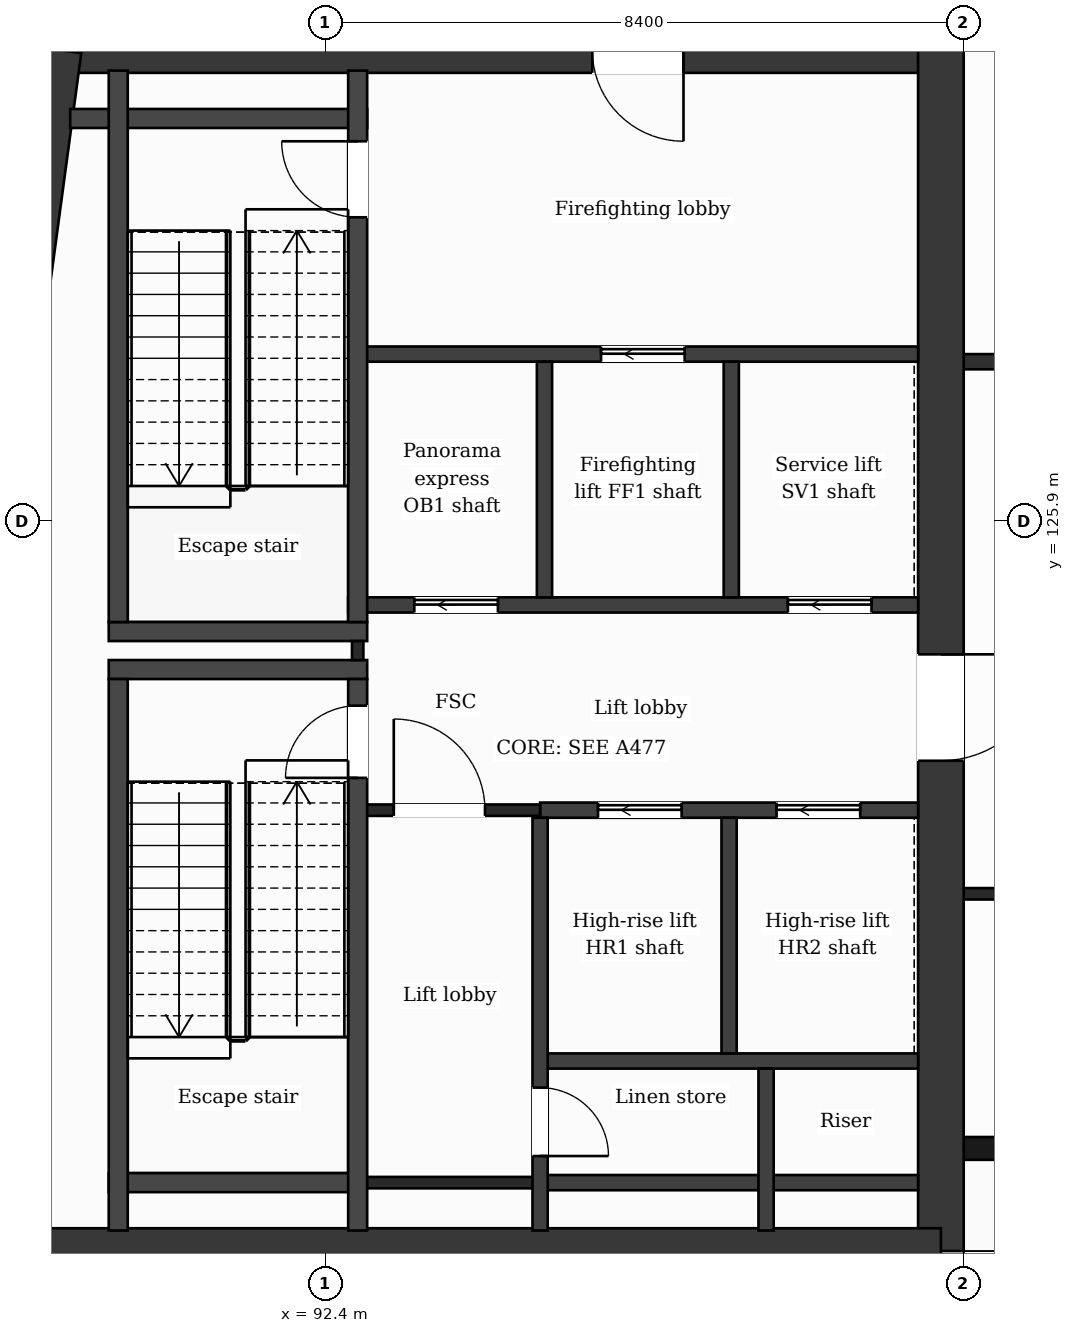
"""IFC4 building model, lengths in metres.
Left out: names, types, materials, properties, quantities, classifications, styles, units other than length and angle.
Written with IfcOpenShell. Run it as: python <this file> out.ifc"""

import sys

from ifc_helpers import new_model, si_unit, direction, frame, frame_2d, origin, place, context, subcontext, project, spatial, rectangle, extrude, element, fill, save


model = new_model("IFC4")
c1 = context("Model", 3, precision=1e-05, world=origin(), true_north=direction((0.0, 1.0)))
c2 = subcontext(c1, "Body", "Model", "MODEL_VIEW")
j1 = project(units=[si_unit("LENGTHUNIT", "METRE"), si_unit("PLANEANGLEUNIT", "RADIAN")], contexts=[c1])
p1 = place(None, origin())
s1 = spatial("IfcSite", under=j1, at=p1, CompositionType="ELEMENT")
p2 = place(p1, origin())
s2 = spatial("IfcBuilding", under=s1, at=p2, CompositionType="ELEMENT")
p3 = place(p2, frame((0.0, 0.0, 315.4)))
s3 = spatial("IfcBuildingStorey", under=s2, at=p3, CompositionType="ELEMENT", Elevation=315.4)
p4 = place(p3, frame((88.893, 132.1, 0.0), z_axis=(0.0, 0.0, 1.0), x_axis=(1.0, 0.0, 0.0)))
e1 = element("IfcWall", 1, at=p4, inside=s3, PredefinedType="SHEAR", context=c2, shape_type="SweptSolid", body=[
    extrude(rectangle(XDim=11.607, YDim=0.6, at=frame_2d((5.803, 0.0))), origin(), (0.0, 0.0, 1.0), 4.5),
])
p5 = place(p4, frame((7.021, 0.0, 0.0)))
e2 = element("IfcOpeningElement", 2, at=p5, cuts=e1, PredefinedType="OPENING", context=c2, shape_type="SweptSolid", body=[
    extrude(rectangle(XDim=1.2, YDim=2.1, at=frame_2d((0.6, 1.05))), frame((0.0, 0.31, 0.0), z_axis=(0.0, -1.0, 0.0), x_axis=(1.0, 0.0, 0.0)), (0.0, 0.0, 1.0), 0.62),
])
p6 = place(p3, frame((100.5, 132.1, 0.0), z_axis=(0.0, 0.0, 1.0), x_axis=(0.0, -1.0, 0.0)))
e3 = element("IfcWall", 3, at=p6, inside=s3, PredefinedType="SHEAR", context=c2, shape_type="SweptSolid", body=[
    extrude(rectangle(XDim=15.8, YDim=0.6, at=frame_2d((7.9, 0.0))), origin(), (0.0, 0.0, 1.0), 4.5),
])
p7 = place(p6, frame((7.95, 0.0, 0.0)))
e4 = element("IfcOpeningElement", 4, at=p7, cuts=e3, PredefinedType="OPENING", context=c2, shape_type="SweptSolid", body=[
    extrude(rectangle(XDim=1.4, YDim=2.1, at=frame_2d((0.7, 1.05))), frame((0.0, 0.31, 0.0), z_axis=(0.0, -1.0, 0.0), x_axis=(1.0, 0.0, 0.0)), (0.0, 0.0, 1.0), 0.62),
])
p8 = place(p3, frame((100.5, 116.3, 0.0), z_axis=(0.0, 0.0, 1.0), x_axis=(-1.0, 0.0, 0.0)))
e5 = element("IfcWall", 5, at=p8, inside=s3, PredefinedType="SHEAR", context=c2, shape_type="SweptSolid", body=[
    extrude(rectangle(XDim=13.734, YDim=0.6, at=frame_2d((6.867, 0.0))), origin(), (0.0, 0.0, 1.0), 4.5),
])
p9 = place(p3, frame((86.766, 116.3, 0.0), z_axis=(0.0, 0.0, 1.0), x_axis=(0.13341345841, 0.991060466932, 0.0)))
e6 = element("IfcWall", 6, at=p9, inside=s3, PredefinedType="SHEAR", context=c2, shape_type="SweptSolid", body=[
    extrude(rectangle(XDim=15.943, YDim=0.6, at=frame_2d((7.971, 0.0))), origin(), (0.0, 0.0, 1.0), 4.5),
])
p10 = place(p3, frame((100.8, 117.65, 0.0), z_axis=(0.0, 0.0, 1.0), x_axis=(1.0, 0.0, 0.0)))
e7 = element("IfcWall", 7, at=p10, inside=s3, PredefinedType="SOLIDWALL", context=c2, shape_type="SweptSolid", body=[
    extrude(rectangle(XDim=25.2, YDim=0.3, at=frame_2d((12.6, 0.0))), origin(), (0.0, 0.0, 1.0), 4.05),
])
p11 = place(p10, frame((1.55, 0.0, 0.9)))
e8 = element("IfcOpeningElement", 8, at=p11, cuts=e7, PredefinedType="OPENING", context=c2, shape_type="SweptSolid", body=[
    extrude(rectangle(XDim=1.2, YDim=2.1, at=frame_2d((0.6, 1.05))), frame((0.0, 0.16, 0.0), z_axis=(0.0, -1.0, 0.0), x_axis=(1.0, 0.0, 0.0)), (0.0, 0.0, 1.0), 0.32),
])
p12 = place(p10, frame((5.7, 0.0, 0.9)))
e9 = element("IfcOpeningElement", 9, at=p12, cuts=e7, PredefinedType="OPENING", context=c2, shape_type="SweptSolid", body=[
    extrude(rectangle(XDim=1.2, YDim=2.1, at=frame_2d((0.6, 1.05))), frame((0.0, 0.16, 0.0), z_axis=(0.0, -1.0, 0.0), x_axis=(1.0, 0.0, 0.0)), (0.0, 0.0, 1.0), 0.32),
])
p13 = place(p10, frame((9.0, 0.0, 0.0)))
e10 = element("IfcOpeningElement", 10, at=p13, cuts=e7, PredefinedType="OPENING", context=c2, shape_type="SweptSolid", body=[
    extrude(rectangle(XDim=1.2, YDim=2.4, at=frame_2d((0.6, 1.2))), frame((0.0, 0.16, 0.0), z_axis=(0.0, -1.0, 0.0), x_axis=(1.0, 0.0, 0.0)), (0.0, 0.0, 1.0), 0.32),
])
p14 = place(p10, frame((10.8, 0.0, 0.9)))
e11 = element("IfcOpeningElement", 11, at=p14, cuts=e7, PredefinedType="OPENING", context=c2, shape_type="SweptSolid", body=[
    extrude(rectangle(XDim=1.2, YDim=2.1, at=frame_2d((0.6, 1.05))), frame((0.0, 0.16, 0.0), z_axis=(0.0, -1.0, 0.0), x_axis=(1.0, 0.0, 0.0)), (0.0, 0.0, 1.0), 0.32),
])
p15 = place(p10, frame((13.5, 0.0, 0.9)))
e12 = element("IfcOpeningElement", 12, at=p15, cuts=e7, PredefinedType="OPENING", context=c2, shape_type="SweptSolid", body=[
    extrude(rectangle(XDim=2.4, YDim=2.1, at=frame_2d((1.2, 1.05))), frame((0.0, 0.16, 0.0), z_axis=(0.0, -1.0, 0.0), x_axis=(1.0, 0.0, 0.0)), (0.0, 0.0, 1.0), 0.32),
])
p16 = place(p10, frame((17.4, 0.0, 0.0)))
e13 = element("IfcOpeningElement", 13, at=p16, cuts=e7, PredefinedType="OPENING", context=c2, shape_type="SweptSolid", body=[
    extrude(rectangle(XDim=1.2, YDim=2.4, at=frame_2d((0.6, 1.2))), frame((0.0, 0.16, 0.0), z_axis=(0.0, -1.0, 0.0), x_axis=(1.0, 0.0, 0.0)), (0.0, 0.0, 1.0), 0.32),
])
p17 = place(p10, frame((19.2, 0.0, 0.9)))
e14 = element("IfcOpeningElement", 14, at=p17, cuts=e7, PredefinedType="OPENING", context=c2, shape_type="SweptSolid", body=[
    extrude(rectangle(XDim=1.2, YDim=2.1, at=frame_2d((0.6, 1.05))), frame((0.0, 0.16, 0.0), z_axis=(0.0, -1.0, 0.0), x_axis=(1.0, 0.0, 0.0)), (0.0, 0.0, 1.0), 0.32),
])
p18 = place(p10, frame((21.85, 0.0, 0.9)))
e15 = element("IfcOpeningElement", 15, at=p18, cuts=e7, PredefinedType="OPENING", context=c2, shape_type="SweptSolid", body=[
    extrude(rectangle(XDim=2.4, YDim=2.1, at=frame_2d((1.2, 1.05))), frame((0.0, 0.16, 0.0), z_axis=(0.0, -1.0, 0.0), x_axis=(1.0, 0.0, 0.0)), (0.0, 0.0, 1.0), 0.32),
])
p19 = place(p3, frame((95.227, 117.2, 0.0), z_axis=(0.0, 0.0, 1.0), x_axis=(1.0, 0.0, 0.0)))
e16 = element("IfcWall", 16, at=p19, inside=s3, PredefinedType="PARTITIONING", context=c2, shape_type="SweptSolid", body=[
    extrude(rectangle(XDim=4.973, YDim=0.2, at=frame_2d((2.486, 0.0))), origin(), (0.0, 0.0, 1.0), 4.05),
])
p20 = place(p3, frame((92.827, 117.2, 0.0), z_axis=(0.0, 0.0, 1.0), x_axis=(1.0, 0.0, 0.0)))
e17 = element("IfcWall", 17, at=p20, inside=s3, PredefinedType="PARTITIONING", context=c2, shape_type="SweptSolid", body=[
    extrude(rectangle(XDim=2.4, YDim=0.15, at=frame_2d((1.2, 0.0))), origin(), (0.0, 0.0, 1.0), 4.05),
])
p21 = place(p3, frame((89.552, 117.2, 0.0), z_axis=(0.0, 0.0, 1.0), x_axis=(1.0, 0.0, 0.0)))
e18 = element("IfcWall", 18, at=p21, inside=s3, PredefinedType="PARTITIONING", context=c2, shape_type="SweptSolid", body=[
    extrude(rectangle(XDim=3.275, YDim=0.25, at=frame_2d((1.637, 0.0))), origin(), (0.0, 0.0, 1.0), 4.05),
])
p22 = place(p3, frame((95.227, 118.8, 0.0), z_axis=(0.0, 0.0, 1.0), x_axis=(1.0, 0.0, 0.0)))
e19 = element("IfcWall", 19, at=p22, inside=s3, PredefinedType="PARTITIONING", context=c2, shape_type="SweptSolid", body=[
    extrude(rectangle(XDim=4.973, YDim=0.2, at=frame_2d((2.486, 0.0))), origin(), (0.0, 0.0, 1.0), 4.05),
])
p23 = place(p3, frame((100.8, 121.0, 0.0), z_axis=(0.0, 0.0, 1.0), x_axis=(1.0, 0.0, 0.0)))
e20 = element("IfcWall", 20, at=p23, inside=s3, PredefinedType="PARTITIONING", context=c2, shape_type="SweptSolid", body=[
    extrude(rectangle(XDim=21.075, YDim=0.15, at=frame_2d((10.538, 0.0))), origin(), (0.0, 0.0, 1.0), 4.05),
])
p24 = place(p23, frame((2.9, 0.0, 0.0)))
e21 = element("IfcOpeningElement", 21, at=p24, cuts=e20, PredefinedType="OPENING", context=c2, shape_type="SweptSolid", body=[
    extrude(rectangle(XDim=1.2, YDim=2.1, at=frame_2d((0.6, 1.05))), frame((0.0, 0.085, 0.0), z_axis=(0.0, -1.0, 0.0), x_axis=(1.0, 0.0, 0.0)), (0.0, 0.0, 1.0), 0.17),
])
p25 = place(p23, frame((9.9, 0.0, 0.0)))
e22 = element("IfcOpeningElement", 22, at=p25, cuts=e20, PredefinedType="OPENING", context=c2, shape_type="SweptSolid", body=[
    extrude(rectangle(XDim=1.2, YDim=2.1, at=frame_2d((0.6, 1.05))), frame((0.0, 0.085, 0.0), z_axis=(0.0, -1.0, 0.0), x_axis=(1.0, 0.0, 0.0)), (0.0, 0.0, 1.0), 0.17),
])
p26 = place(p3, frame((95.227, 122.1, 0.0), z_axis=(0.0, 0.0, 1.0), x_axis=(1.0, 0.0, 0.0)))
e23 = element("IfcWall", 23, at=p26, inside=s3, PredefinedType="PARTITIONING", context=c2, shape_type="SweptSolid", body=[
    extrude(rectangle(XDim=4.973, YDim=0.2, at=frame_2d((2.486, 0.0))), origin(), (0.0, 0.0, 1.0), 4.05),
])
p27 = place(p26, frame((0.762, 0.0, 0.0)))
e24 = element("IfcOpeningElement", 24, at=p27, cuts=e23, PredefinedType="OPENING", context=c2, shape_type="SweptSolid", body=[
    extrude(rectangle(XDim=1.1, YDim=2.1, at=frame_2d((0.55, 1.05))), frame((0.0, 0.11, 0.0), z_axis=(0.0, -1.0, 0.0), x_axis=(1.0, 0.0, 0.0)), (0.0, 0.0, 1.0), 0.22),
])
p28 = place(p26, frame((3.111, 0.0, 0.0)))
e25 = element("IfcOpeningElement", 25, at=p28, cuts=e23, PredefinedType="OPENING", context=c2, shape_type="SweptSolid", body=[
    extrude(rectangle(XDim=1.1, YDim=2.1, at=frame_2d((0.55, 1.05))), frame((0.0, 0.11, 0.0), z_axis=(0.0, -1.0, 0.0), x_axis=(1.0, 0.0, 0.0)), (0.0, 0.0, 1.0), 0.22),
])
p29 = place(p3, frame((92.827, 122.1, 0.0), z_axis=(0.0, 0.0, 1.0), x_axis=(1.0, 0.0, 0.0)))
e26 = element("IfcWall", 26, at=p29, inside=s3, PredefinedType="PARTITIONING", context=c2, shape_type="SweptSolid", body=[
    extrude(rectangle(XDim=2.4, YDim=0.15, at=frame_2d((1.2, 0.0))), origin(), (0.0, 0.0, 1.0), 4.05),
])
p30 = place(p29, frame((0.475, 0.0, 0.0)))
e27 = element("IfcOpeningElement", 27, at=p30, cuts=e26, PredefinedType="OPENING", context=c2, shape_type="SweptSolid", body=[
    extrude(rectangle(XDim=1.2, YDim=2.1, at=frame_2d((0.6, 1.05))), frame((0.0, 0.085, 0.0), z_axis=(0.0, -1.0, 0.0), x_axis=(1.0, 0.0, 0.0)), (0.0, 0.0, 1.0), 0.17),
])
for number, where, z_axis, x_axis in (
    (28, (89.552, 123.95, 0.0), (0.0, 0.0, 1.0), (1.0, 0.0, 0.0)),
    (29, (89.552, 124.45, 0.0), (0.0, 0.0, 1.0), (1.0, 0.0, 0.0)),
):
    element("IfcWall", number, at=place(p3, frame(where, z_axis=z_axis, x_axis=x_axis)), inside=s3, PredefinedType="PARTITIONING", context=c2, shape_type="SweptSolid", body=[
        extrude(rectangle(XDim=3.4, YDim=0.25, at=frame_2d((1.7, 0.0))), origin(), (0.0, 0.0, 1.0), 4.05),
    ])
p31 = place(p3, frame((92.702, 124.8, 0.0), z_axis=(0.0, 0.0, 1.0), x_axis=(1.0, 0.0, 0.0)))
e30 = element("IfcWall", 30, at=p31, inside=s3, PredefinedType="PARTITIONING", context=c2, shape_type="SweptSolid", body=[
    extrude(rectangle(XDim=7.498, YDim=0.2, at=frame_2d((3.749, 0.0))), origin(), (0.0, 0.0, 1.0), 4.05),
])
p32 = place(p31, frame((0.87, 0.0, 0.0)))
e31 = element("IfcOpeningElement", 31, at=p32, cuts=e30, PredefinedType="OPENING", context=c2, shape_type="SweptSolid", body=[
    extrude(rectangle(XDim=1.1, YDim=2.1, at=frame_2d((0.55, 1.05))), frame((0.0, 0.11, 0.0), z_axis=(0.0, -1.0, 0.0), x_axis=(1.0, 0.0, 0.0)), (0.0, 0.0, 1.0), 0.22),
])
p33 = place(p31, frame((5.785, 0.0, 0.0)))
e32 = element("IfcOpeningElement", 32, at=p33, cuts=e30, PredefinedType="OPENING", context=c2, shape_type="SweptSolid", body=[
    extrude(rectangle(XDim=1.1, YDim=2.1, at=frame_2d((0.55, 1.05))), frame((0.0, 0.11, 0.0), z_axis=(0.0, -1.0, 0.0), x_axis=(1.0, 0.0, 0.0)), (0.0, 0.0, 1.0), 0.22),
])
p34 = place(p3, frame((100.8, 128.0, 0.0), z_axis=(0.0, 0.0, 1.0), x_axis=(1.0, 0.0, 0.0)))
e33 = element("IfcWall", 33, at=p34, inside=s3, PredefinedType="PARTITIONING", context=c2, shape_type="SweptSolid", body=[
    extrude(rectangle(XDim=21.0, YDim=0.2, at=frame_2d((10.5, 0.0))), origin(), (0.0, 0.0, 1.0), 4.05),
])
p35 = place(p3, frame((92.827, 128.1, 0.0), z_axis=(0.0, 0.0, 1.0), x_axis=(1.0, 0.0, 0.0)))
e34 = element("IfcWall", 34, at=p35, inside=s3, PredefinedType="PARTITIONING", context=c2, shape_type="SweptSolid", body=[
    extrude(rectangle(XDim=7.373, YDim=0.2, at=frame_2d((3.687, 0.0))), origin(), (0.0, 0.0, 1.0), 4.05),
])
p36 = place(p35, frame((3.202, 0.0, 0.0)))
e35 = element("IfcOpeningElement", 35, at=p36, cuts=e34, PredefinedType="OPENING", context=c2, shape_type="SweptSolid", body=[
    extrude(rectangle(XDim=1.1, YDim=2.1, at=frame_2d((0.55, 1.05))), frame((0.0, 0.11, 0.0), z_axis=(0.0, -1.0, 0.0), x_axis=(1.0, 0.0, 0.0)), (0.0, 0.0, 1.0), 0.22),
])
p37 = place(p3, frame((89.045, 131.2, 0.0), z_axis=(0.0, 0.0, 1.0), x_axis=(1.0, 0.0, 0.0)))
e36 = element("IfcWall", 36, at=p37, inside=s3, PredefinedType="PARTITIONING", context=c2, shape_type="SweptSolid", body=[
    extrude(rectangle(XDim=3.907, YDim=0.25, at=frame_2d((1.954, 0.0))), origin(), (0.0, 0.0, 1.0), 4.05),
])
p38 = place(p3, frame((89.677, 116.57, 0.0), z_axis=(0.0, 0.0, 1.0), x_axis=(0.0, 1.0, 0.0)))
e37 = element("IfcWall", 37, at=p38, inside=s3, PredefinedType="PARTITIONING", context=c2, shape_type="SweptSolid", body=[
    extrude(rectangle(XDim=7.255, YDim=0.25, at=frame_2d((3.627, 0.0))), origin(), (0.0, 0.0, 1.0), 4.05),
])
p39 = place(p3, frame((89.677, 124.575, 0.0), z_axis=(0.0, 0.0, 1.0), x_axis=(0.0, 1.0, 0.0)))
e38 = element("IfcWall", 38, at=p39, inside=s3, PredefinedType="PARTITIONING", context=c2, shape_type="SweptSolid", body=[
    extrude(rectangle(XDim=7.255, YDim=0.25, at=frame_2d((3.627, 0.0))), origin(), (0.0, 0.0, 1.0), 4.05),
])
p40 = place(p3, frame((92.827, 124.075, 0.0), z_axis=(0.0, 0.0, 1.0), x_axis=(0.0, 1.0, 0.0)))
e39 = element("IfcWall", 39, at=p40, inside=s3, PredefinedType="PARTITIONING", context=c2, shape_type="SweptSolid", body=[
    extrude(rectangle(XDim=0.25, YDim=0.15, at=frame_2d((0.125, 0.0))), origin(), (0.0, 0.0, 1.0), 4.05),
])
p41 = place(p3, frame((92.827, 116.57, 0.0), z_axis=(0.0, 0.0, 1.0), x_axis=(0.0, 1.0, 0.0)))
e40 = element("IfcWall", 40, at=p41, inside=s3, PredefinedType="PARTITIONING", context=c2, shape_type="SweptSolid", body=[
    extrude(rectangle(XDim=7.255, YDim=0.25, at=frame_2d((3.627, 0.0))), origin(), (0.0, 0.0, 1.0), 4.05),
])
p42 = place(p41, frame((5.955, 0.0, 0.0)))
e41 = element("IfcOpeningElement", 41, at=p42, cuts=e40, PredefinedType="OPENING", context=c2, shape_type="SweptSolid", body=[
    extrude(rectangle(XDim=0.95, YDim=2.1, at=frame_2d((0.475, 1.05))), frame((0.0, 0.135, 0.0), z_axis=(0.0, -1.0, 0.0), x_axis=(1.0, 0.0, 0.0)), (0.0, 0.0, 1.0), 0.27),
])
p43 = place(p3, frame((92.827, 124.575, 0.0), z_axis=(0.0, 0.0, 1.0), x_axis=(0.0, 1.0, 0.0)))
e42 = element("IfcWall", 42, at=p43, inside=s3, PredefinedType="PARTITIONING", context=c2, shape_type="SweptSolid", body=[
    extrude(rectangle(XDim=7.255, YDim=0.25, at=frame_2d((3.627, 0.0))), origin(), (0.0, 0.0, 1.0), 4.05),
])
p44 = place(p43, frame((5.325, 0.0, 0.0)))
e43 = element("IfcOpeningElement", 43, at=p44, cuts=e42, PredefinedType="OPENING", context=c2, shape_type="SweptSolid", body=[
    extrude(rectangle(XDim=1.0, YDim=2.1, at=frame_2d((0.5, 1.05))), frame((0.0, 0.135, 0.0), z_axis=(0.0, -1.0, 0.0), x_axis=(1.0, 0.0, 0.0)), (0.0, 0.0, 1.0), 0.27),
])
p45 = place(p3, frame((95.227, 116.57, 0.0), z_axis=(0.0, 0.0, 1.0), x_axis=(0.0, 1.0, 0.0)))
e44 = element("IfcWall", 44, at=p45, inside=s3, PredefinedType="PARTITIONING", context=c2, shape_type="SweptSolid", body=[
    extrude(rectangle(XDim=5.43, YDim=0.2, at=frame_2d((2.715, 0.0))), origin(), (0.0, 0.0, 1.0), 4.05),
])
p46 = place(p45, frame((0.98, 0.0, 0.0)))
e45 = element("IfcOpeningElement", 45, at=p46, cuts=e44, PredefinedType="OPENING", context=c2, shape_type="SweptSolid", body=[
    extrude(rectangle(XDim=0.9, YDim=2.1, at=frame_2d((0.45, 1.05))), frame((0.0, 0.11, 0.0), z_axis=(0.0, -1.0, 0.0), x_axis=(1.0, 0.0, 0.0)), (0.0, 0.0, 1.0), 0.22),
])
for number, where, z_axis, x_axis in (
    (46, (95.285, 124.9, 0.0), (0.0, 0.0, 1.0), (0.0, 1.0, 0.0)),
    (47, (97.713, 118.9, 0.0), (0.0, 0.0, 1.0), (0.0, 1.0, 0.0)),
    (48, (97.742, 124.9, 0.0), (0.0, 0.0, 1.0), (0.0, 1.0, 0.0)),
):
    element("IfcWall", number, at=place(p3, frame(where, z_axis=z_axis, x_axis=x_axis)), inside=s3, PredefinedType="PARTITIONING", context=c2, shape_type="SweptSolid", body=[
        extrude(rectangle(XDim=3.1, YDim=0.2, at=frame_2d((1.55, 0.0))), origin(), (0.0, 0.0, 1.0), 4.05),
    ])
p47 = place(p3, frame((98.2, 116.57, 0.0), z_axis=(0.0, 0.0, 1.0), x_axis=(0.0, 1.0, 0.0)))
e49 = element("IfcWall", 49, at=p47, inside=s3, PredefinedType="PARTITIONING", context=c2, shape_type="SweptSolid", body=[
    extrude(rectangle(XDim=2.13, YDim=0.2, at=frame_2d((1.065, 0.0))), origin(), (0.0, 0.0, 1.0), 4.05),
])
p48 = place(p30, origin())
e50 = element("IfcDoor", 50, at=p48, inside=s3, OperationType="SINGLE_SWING_LEFT", PredefinedType="DOOR", context=c2, shape_type="SweptSolid", body=[
    extrude(rectangle(XDim=1.2, YDim=2.1, at=frame_2d((0.6, 1.05))), frame((0.0, 0.025, 0.0), z_axis=(0.0, -1.0, 0.0), x_axis=(1.0, 0.0, 0.0)), (0.0, 0.0, 1.0), 0.05),
])
fill(e27, e50)
p49 = place(p27, origin())
e51 = element("IfcDoor", 51, at=p49, inside=s3, OperationType="SLIDING_TO_LEFT", PredefinedType="DOOR", context=c2, shape_type="SweptSolid", body=[
    extrude(rectangle(XDim=1.1, YDim=2.1, at=frame_2d((0.55, 1.05))), frame((0.0, 0.025, 0.0), z_axis=(0.0, -1.0, 0.0), x_axis=(1.0, 0.0, 0.0)), (0.0, 0.0, 1.0), 0.05),
])
fill(e24, e51)
p50 = place(p28, origin())
e52 = element("IfcDoor", 52, at=p50, inside=s3, OperationType="SLIDING_TO_LEFT", PredefinedType="DOOR", context=c2, shape_type="SweptSolid", body=[
    extrude(rectangle(XDim=1.1, YDim=2.1, at=frame_2d((0.55, 1.05))), frame((0.0, 0.025, 0.0), z_axis=(0.0, -1.0, 0.0), x_axis=(1.0, 0.0, 0.0)), (0.0, 0.0, 1.0), 0.05),
])
fill(e25, e52)
p51 = place(p32, origin())
e53 = element("IfcDoor", 53, at=p51, inside=s3, OperationType="SLIDING_TO_LEFT", PredefinedType="DOOR", context=c2, shape_type="SweptSolid", body=[
    extrude(rectangle(XDim=1.1, YDim=2.1, at=frame_2d((0.55, 1.05))), frame((0.0, 0.025, 0.0), z_axis=(0.0, -1.0, 0.0), x_axis=(1.0, 0.0, 0.0)), (0.0, 0.0, 1.0), 0.05),
])
fill(e31, e53)
p52 = place(p36, origin())
e54 = element("IfcDoor", 54, at=p52, inside=s3, OperationType="SLIDING_TO_LEFT", PredefinedType="DOOR", context=c2, shape_type="SweptSolid", body=[
    extrude(rectangle(XDim=1.1, YDim=2.1, at=frame_2d((0.55, 1.05))), frame((0.0, 0.025, 0.0), z_axis=(0.0, -1.0, 0.0), x_axis=(1.0, 0.0, 0.0)), (0.0, 0.0, 1.0), 0.05),
])
fill(e35, e54)
p53 = place(p33, origin())
e55 = element("IfcDoor", 55, at=p53, inside=s3, OperationType="SLIDING_TO_LEFT", PredefinedType="DOOR", context=c2, shape_type="SweptSolid", body=[
    extrude(rectangle(XDim=1.1, YDim=2.1, at=frame_2d((0.55, 1.05))), frame((0.0, 0.025, 0.0), z_axis=(0.0, -1.0, 0.0), x_axis=(1.0, 0.0, 0.0)), (0.0, 0.0, 1.0), 0.05),
])
fill(e32, e55)
p54 = place(p42, origin())
e56 = element("IfcDoor", 56, at=p54, inside=s3, OperationType="SINGLE_SWING_LEFT", PredefinedType="DOOR", context=c2, shape_type="SweptSolid", body=[
    extrude(rectangle(XDim=0.95, YDim=2.1, at=frame_2d((0.475, 1.05))), frame((0.0, 0.025, 0.0), z_axis=(0.0, -1.0, 0.0), x_axis=(1.0, 0.0, 0.0)), (0.0, 0.0, 1.0), 0.05),
])
fill(e41, e56)
p55 = place(p44, origin())
e57 = element("IfcDoor", 57, at=p55, inside=s3, OperationType="SINGLE_SWING_RIGHT", PredefinedType="DOOR", context=c2, shape_type="SweptSolid", body=[
    extrude(rectangle(XDim=1.0, YDim=2.1, at=frame_2d((0.5, 1.05))), frame((0.0, 0.025, 0.0), z_axis=(0.0, -1.0, 0.0), x_axis=(1.0, 0.0, 0.0)), (0.0, 0.0, 1.0), 0.05),
])
fill(e43, e57)
p56 = place(p46, origin())
e58 = element("IfcDoor", 58, at=p56, inside=s3, OperationType="SINGLE_SWING_LEFT", PredefinedType="DOOR", context=c2, shape_type="SweptSolid", body=[
    extrude(rectangle(XDim=0.9, YDim=2.1, at=frame_2d((0.45, 1.05))), frame((0.0, 0.025, 0.0), z_axis=(0.0, -1.0, 0.0), x_axis=(1.0, 0.0, 0.0)), (0.0, 0.0, 1.0), 0.05),
])
fill(e45, e58)
p57 = place(p7, origin())
e59 = element("IfcDoor", 59, at=p57, inside=s3, OperationType="SINGLE_SWING_LEFT", PredefinedType="DOOR", context=c2, shape_type="SweptSolid", body=[
    extrude(rectangle(XDim=1.4, YDim=2.1, at=frame_2d((0.7, 1.05))), frame((0.0, 0.025, 0.0), z_axis=(0.0, -1.0, 0.0), x_axis=(1.0, 0.0, 0.0)), (0.0, 0.0, 1.0), 0.05),
])
fill(e4, e59)
save(model, sys.argv[1])
